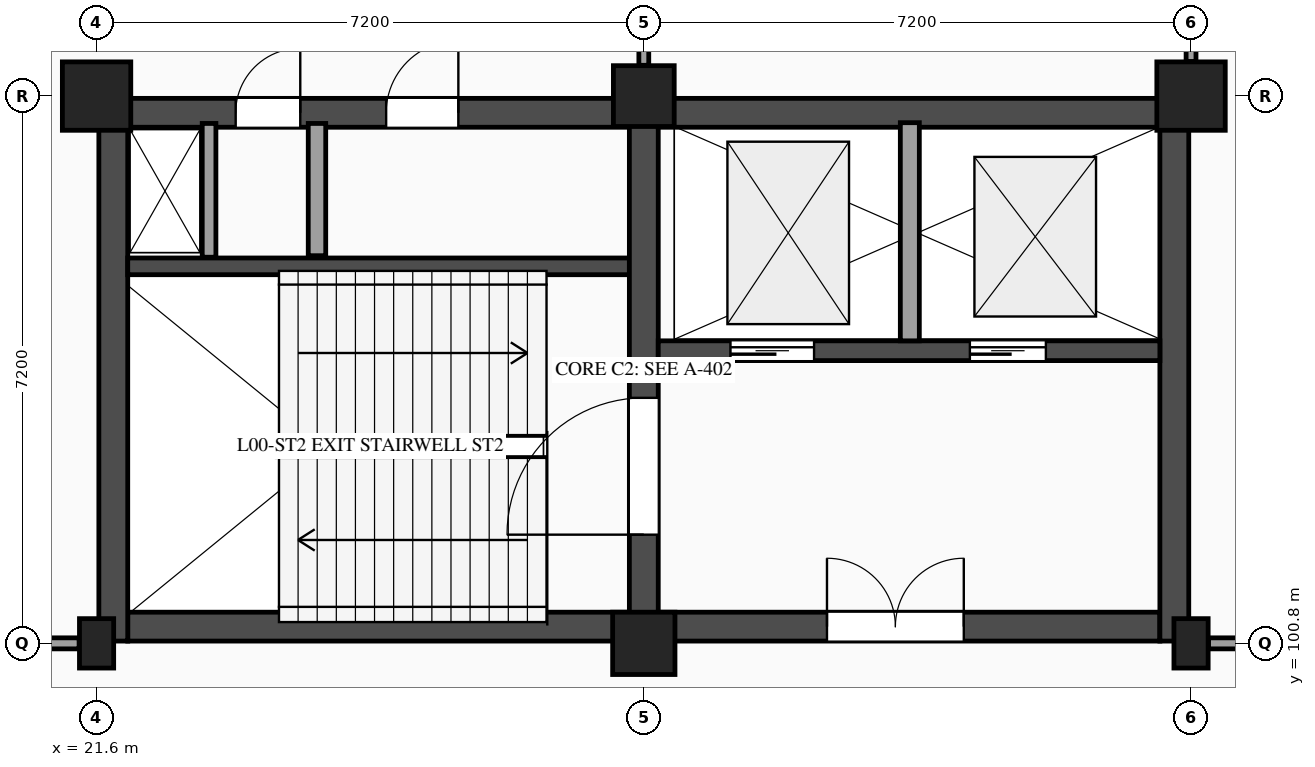
"""IFC4 building model, lengths in metres.
Left out: names, types, materials, properties, quantities, classifications, styles, units other than length and angle.
Written with IfcOpenShell. Run it as: python <this file> out.ifc"""

import sys

from ifc_helpers import new_model, si_unit, direction, frame, frame_2d, origin, origin_2d, place, context, subcontext, project, spatial, rectangle, extrude, element, fill, save


model = new_model("IFC4")
c1 = context("Model", 3, precision=1e-05, world=origin(), true_north=direction((0.0, 1.0)))
c2 = subcontext(c1, "Body", "Model", "MODEL_VIEW")
j1 = project(units=[si_unit("LENGTHUNIT", "METRE"), si_unit("PLANEANGLEUNIT", "RADIAN")], contexts=[c1])
p1 = place(None, origin())
s1 = spatial("IfcSite", under=j1, at=p1, CompositionType="ELEMENT")
p2 = place(p1, origin())
s2 = spatial("IfcBuilding", under=s1, at=p2, CompositionType="ELEMENT")
p3 = place(p2, origin())
s3 = spatial("IfcBuildingStorey", under=s2, at=p3, CompositionType="ELEMENT", Elevation=0.0)
p4 = place(p3, frame((21.6, 100.8, 0.0), z_axis=(0.0, 0.0, 1.0), x_axis=(1.0, 0.0, 0.0)))
e1 = element("IfcColumn", 1, at=p4, inside=s3, PredefinedType="PILASTER", context=c2, shape_type="SweptSolid", body=[
    extrude(rectangle(XDim=0.45, YDim=0.65, at=origin_2d()), origin(), (0.0, 0.0, 1.0), 5.4),
])
p5 = place(p3, frame((21.6, 108.0, 0.0), z_axis=(0.0, 0.0, 1.0), x_axis=(1.0, 0.0, 0.0)))
e2 = element("IfcColumn", 2, at=p5, inside=s3, PredefinedType="COLUMN", context=c2, shape_type="SweptSolid", body=[
    extrude(rectangle(XDim=0.9, YDim=0.9, at=origin_2d()), origin(), (0.0, 0.0, 1.0), 5.4),
])
p6 = place(p3, frame((28.8, 100.8, 0.0), z_axis=(0.0, 0.0, 1.0), x_axis=(1.0, 0.0, 0.0)))
e3 = element("IfcColumn", 3, at=p6, inside=s3, PredefinedType="COLUMN", context=c2, shape_type="SweptSolid", body=[
    extrude(rectangle(XDim=0.82, YDim=0.82, at=origin_2d()), origin(), (0.0, 0.0, 1.0), 5.4),
])
p7 = place(p3, frame((28.8, 108.0, 0.0), z_axis=(0.0, 0.0, 1.0), x_axis=(1.0, 0.0, 0.0)))
e4 = element("IfcColumn", 4, at=p7, inside=s3, PredefinedType="COLUMN", context=c2, shape_type="SweptSolid", body=[
    extrude(rectangle(XDim=0.8, YDim=0.8, at=origin_2d()), origin(), (0.0, 0.0, 1.0), 5.4),
])
p8 = place(p3, frame((36.0, 100.8, 0.0), z_axis=(0.0, 0.0, 1.0), x_axis=(1.0, 0.0, 0.0)))
e5 = element("IfcColumn", 5, at=p8, inside=s3, PredefinedType="PILASTER", context=c2, shape_type="SweptSolid", body=[
    extrude(rectangle(XDim=0.45, YDim=0.65, at=origin_2d()), origin(), (0.0, 0.0, 1.0), 5.4),
])
p9 = place(p3, frame((36.0, 108.0, 0.0), z_axis=(0.0, 0.0, 1.0), x_axis=(1.0, 0.0, 0.0)))
e6 = element("IfcColumn", 6, at=p9, inside=s3, PredefinedType="COLUMN", context=c2, shape_type="SweptSolid", body=[
    extrude(rectangle(XDim=0.9, YDim=0.9, at=origin_2d()), origin(), (0.0, 0.0, 1.0), 5.4),
])
p10 = place(p3, frame((22.01, 101.02, 0.0), z_axis=(0.0, 0.0, 1.0), x_axis=(1.0, 0.0, 0.0)))
e7 = element("IfcWall", 7, at=p10, inside=s3, PredefinedType="SHEAR", context=c2, shape_type="SweptSolid", body=[
    extrude(rectangle(XDim=6.6, YDim=0.38, at=frame_2d((3.3, 0.0))), origin(), (0.0, 0.0, 1.0), 5.09),
])
p11 = place(p3, frame((21.82, 107.97, 0.0), z_axis=(0.0, 0.0, 1.0), x_axis=(0.0, -1.0, 0.0)))
e8 = element("IfcWall", 8, at=p11, inside=s3, PredefinedType="SHEAR", context=c2, shape_type="SweptSolid", body=[
    extrude(rectangle(XDim=7.14, YDim=0.38, at=frame_2d((3.57, 0.0))), origin(), (0.0, 0.0, 1.0), 5.09),
])
p12 = place(p3, frame((22.01, 107.78, 0.0), z_axis=(0.0, 0.0, 1.0), x_axis=(1.0, 0.0, 0.0)))
e9 = element("IfcWall", 9, at=p12, inside=s3, PredefinedType="SHEAR", context=c2, shape_type="SweptSolid", body=[
    extrude(rectangle(XDim=6.6, YDim=0.38, at=frame_2d((3.3, 0.0))), origin(), (0.0, 0.0, 1.0), 5.09),
])
p13 = place(p12, frame((1.42, 0.0, 0.0)))
e10 = element("IfcOpeningElement", 10, at=p13, cuts=e9, PredefinedType="OPENING", context=c2, shape_type="SweptSolid", body=[
    extrude(rectangle(XDim=0.85, YDim=2.1, at=frame_2d((0.425, 1.05))), frame((0.0, 0.2, 0.0), z_axis=(0.0, -1.0, 0.0), x_axis=(1.0, 0.0, 0.0)), (0.0, 0.0, 1.0), 0.4),
])
p14 = place(p12, frame((3.4, 0.0, 0.0)))
e11 = element("IfcOpeningElement", 11, at=p14, cuts=e9, PredefinedType="OPENING", context=c2, shape_type="SweptSolid", body=[
    extrude(rectangle(XDim=0.95, YDim=2.15, at=frame_2d((0.475, 1.075))), frame((0.0, 0.2, 0.0), z_axis=(0.0, -1.0, 0.0), x_axis=(1.0, 0.0, 0.0)), (0.0, 0.0, 1.0), 0.4),
])
p15 = place(p3, frame((22.01, 105.76, 0.0), z_axis=(0.0, 0.0, 1.0), x_axis=(1.0, 0.0, 0.0)))
e12 = element("IfcWall", 12, at=p15, inside=s3, PredefinedType="SHEAR", context=c2, shape_type="SweptSolid", body=[
    extrude(rectangle(XDim=6.6, YDim=0.22, at=frame_2d((3.3, 0.0))), origin(), (0.0, 0.0, 1.0), 5.09),
])
p16 = place(p3, frame((24.5, 105.9, 0.0), z_axis=(0.0, 0.0, 1.0), x_axis=(0.0, 1.0, 0.0)))
e13 = element("IfcWall", 13, at=p16, inside=s3, PredefinedType="PARTITIONING", context=c2, shape_type="SweptSolid", body=[
    extrude(rectangle(XDim=1.74, YDim=0.23, at=frame_2d((0.87, 0.0))), origin(), (0.0, 0.0, 1.0), 5.09),
])
p17 = place(p3, frame((23.08, 105.88, 0.0), z_axis=(0.0, 0.0, 1.0), x_axis=(0.0, 1.0, 0.0)))
e14 = element("IfcWall", 14, at=p17, inside=s3, PredefinedType="PARTITIONING", context=c2, shape_type="SweptSolid", body=[
    extrude(rectangle(XDim=1.76, YDim=0.18, at=frame_2d((0.88, 0.0))), origin(), (0.0, 0.0, 1.0), 5.09),
])
p18 = place(p3, frame((28.8, 100.83, 0.0), z_axis=(0.0, 0.0, 1.0), x_axis=(0.0, 1.0, 0.0)))
e15 = element("IfcWall", 15, at=p18, inside=s3, PredefinedType="SHEAR", context=c2, shape_type="SweptSolid", body=[
    extrude(rectangle(XDim=7.14, YDim=0.38, at=frame_2d((3.57, 0.0))), origin(), (0.0, 0.0, 1.0), 5.09),
])
p19 = place(p18, frame((1.4, 0.0, 0.0)))
e16 = element("IfcOpeningElement", 16, at=p19, cuts=e15, PredefinedType="OPENING", context=c2, shape_type="SweptSolid", body=[
    extrude(rectangle(XDim=1.8, YDim=2.2, at=frame_2d((0.9, 1.1))), frame((0.0, 0.2, 0.0), z_axis=(0.0, -1.0, 0.0), x_axis=(1.0, 0.0, 0.0)), (0.0, 0.0, 1.0), 0.4),
])
p20 = place(p3, frame((28.99, 101.02, 0.0), z_axis=(0.0, 0.0, 1.0), x_axis=(1.0, 0.0, 0.0)))
e17 = element("IfcWall", 17, at=p20, inside=s3, PredefinedType="SHEAR", context=c2, shape_type="SweptSolid", body=[
    extrude(rectangle(XDim=6.6, YDim=0.38, at=frame_2d((3.3, 0.0))), origin(), (0.0, 0.0, 1.0), 5.09),
])
p21 = place(p20, frame((2.22, 0.0, 0.0)))
e18 = element("IfcOpeningElement", 18, at=p21, cuts=e17, PredefinedType="OPENING", context=c2, shape_type="SweptSolid", body=[
    extrude(rectangle(XDim=1.8, YDim=2.2, at=frame_2d((0.9, 1.1))), frame((0.0, 0.2, 0.0), z_axis=(0.0, -1.0, 0.0), x_axis=(1.0, 0.0, 0.0)), (0.0, 0.0, 1.0), 0.4),
])
p22 = place(p3, frame((35.78, 100.83, 0.0), z_axis=(0.0, 0.0, 1.0), x_axis=(0.0, 1.0, 0.0)))
e19 = element("IfcWall", 19, at=p22, inside=s3, PredefinedType="SHEAR", context=c2, shape_type="SweptSolid", body=[
    extrude(rectangle(XDim=7.14, YDim=0.38, at=frame_2d((3.57, 0.0))), origin(), (0.0, 0.0, 1.0), 5.09),
])
p23 = place(p3, frame((28.99, 107.78, 0.0), z_axis=(0.0, 0.0, 1.0), x_axis=(1.0, 0.0, 0.0)))
e20 = element("IfcWall", 20, at=p23, inside=s3, PredefinedType="SHEAR", context=c2, shape_type="SweptSolid", body=[
    extrude(rectangle(XDim=6.6, YDim=0.38, at=frame_2d((3.3, 0.0))), origin(), (0.0, 0.0, 1.0), 5.09),
])
p24 = place(p3, frame((28.99, 104.65, 0.0), z_axis=(0.0, 0.0, 1.0), x_axis=(1.0, 0.0, 0.0)))
e21 = element("IfcWall", 21, at=p24, inside=s3, PredefinedType="SHEAR", context=c2, shape_type="SweptSolid", body=[
    extrude(rectangle(XDim=6.6, YDim=0.26, at=frame_2d((3.3, 0.0))), origin(), (0.0, 0.0, 1.0), 5.09),
])
p25 = place(p24, frame((0.95, 0.0, 0.0)))
e22 = element("IfcOpeningElement", 22, at=p25, cuts=e21, PredefinedType="OPENING", context=c2, shape_type="SweptSolid", body=[
    extrude(rectangle(XDim=1.1, YDim=2.2, at=frame_2d((0.55, 1.1))), frame((0.0, 0.14, 0.0), z_axis=(0.0, -1.0, 0.0), x_axis=(1.0, 0.0, 0.0)), (0.0, 0.0, 1.0), 0.28),
])
p26 = place(p24, frame((4.1, 0.0, 0.0)))
e23 = element("IfcOpeningElement", 23, at=p26, cuts=e21, PredefinedType="OPENING", context=c2, shape_type="SweptSolid", body=[
    extrude(rectangle(XDim=1.0, YDim=2.15, at=frame_2d((0.5, 1.075))), frame((0.0, 0.14, 0.0), z_axis=(0.0, -1.0, 0.0), x_axis=(1.0, 0.0, 0.0)), (0.0, 0.0, 1.0), 0.28),
])
p27 = place(p3, frame((32.3, 104.78, 0.0), z_axis=(0.0, 0.0, 1.0), x_axis=(0.0, 1.0, 0.0)))
e24 = element("IfcWall", 24, at=p27, inside=s3, PredefinedType="PARTITIONING", context=c2, shape_type="SweptSolid", body=[
    extrude(rectangle(XDim=2.87, YDim=0.25, at=frame_2d((1.435, 0.0))), origin(), (0.0, 0.0, 1.0), 5.09),
])
p28 = place(p3, frame((14.815, 100.8, 0.0), z_axis=(0.0, 0.0, 1.0), x_axis=(1.0, 0.0, 0.0)))
e25 = element("IfcWall", 25, at=p28, inside=s3, PredefinedType="PARTITIONING", context=c2, shape_type="SweptSolid", body=[
    extrude(rectangle(XDim=6.555, YDim=0.145, at=frame_2d((3.278, 0.0))), origin(), (0.0, 0.0, 1.0), 4.35),
])
p29 = place(p3, frame((28.8, 108.405, 0.0), z_axis=(0.0, 0.0, 1.0), x_axis=(0.0, 1.0, 0.0)))
e26 = element("IfcWall", 26, at=p29, inside=s3, PredefinedType="PARTITIONING", context=c2, shape_type="SweptSolid", body=[
    extrude(rectangle(XDim=6.34, YDim=0.13, at=frame_2d((3.17, 0.0))), origin(), (0.0, 0.0, 1.0), 4.405),
])
p30 = place(p3, frame((36.0, 108.455, 0.0), z_axis=(0.0, 0.0, 1.0), x_axis=(0.0, 1.0, 0.0)))
e27 = element("IfcWall", 27, at=p30, inside=s3, PredefinedType="PARTITIONING", context=c2, shape_type="SweptSolid", body=[
    extrude(rectangle(XDim=6.3, YDim=0.13, at=frame_2d((3.15, 0.0))), origin(), (0.0, 0.0, 1.0), 4.405),
])
p31 = place(p30, frame((2.35, 0.0, 0.0)))
e28 = element("IfcOpeningElement", 28, at=p31, cuts=e27, PredefinedType="OPENING", context=c2, shape_type="SweptSolid", body=[
    extrude(rectangle(XDim=1.6, YDim=2.2, at=frame_2d((0.8, 1.1))), frame((0.0, 0.075, 0.0), z_axis=(0.0, -1.0, 0.0), x_axis=(1.0, 0.0, 0.0)), (0.0, 0.0, 1.0), 0.15),
])
p32 = place(p3, frame((36.23, 100.8, 0.0), z_axis=(0.0, 0.0, 1.0), x_axis=(1.0, 0.0, 0.0)))
e29 = element("IfcWall", 29, at=p32, inside=s3, PredefinedType="PARTITIONING", context=c2, shape_type="SweptSolid", body=[
    extrude(rectangle(XDim=6.555, YDim=0.145, at=frame_2d((3.277, 0.0))), origin(), (0.0, 0.0, 1.0), 4.39),
])
p33 = place(p13, origin())
e30 = element("IfcDoor", 30, at=p33, inside=s3, OperationType="SINGLE_SWING_RIGHT", PredefinedType="DOOR", context=c2, shape_type="SweptSolid", body=[
    extrude(rectangle(XDim=0.85, YDim=2.1, at=frame_2d((0.425, 1.05))), frame((0.0, 0.025, 0.0), z_axis=(0.0, -1.0, 0.0), x_axis=(1.0, 0.0, 0.0)), (0.0, 0.0, 1.0), 0.05),
])
fill(e10, e30)
p34 = place(p19, frame((1.8, 0.0, 0.0), z_axis=(0.0, 0.0, 1.0), x_axis=(-1.0, 0.0, 0.0)))
e31 = element("IfcDoor", 31, at=p34, inside=s3, OperationType="SINGLE_SWING_LEFT", PredefinedType="DOOR", context=c2, shape_type="SweptSolid", body=[
    extrude(rectangle(XDim=1.8, YDim=2.2, at=frame_2d((0.9, 1.1))), frame((0.0, 0.025, 0.0), z_axis=(0.0, -1.0, 0.0), x_axis=(1.0, 0.0, 0.0)), (0.0, 0.0, 1.0), 0.05),
])
fill(e16, e31)
p35 = place(p14, origin())
e32 = element("IfcDoor", 32, at=p35, inside=s3, OperationType="SINGLE_SWING_RIGHT", PredefinedType="DOOR", context=c2, shape_type="SweptSolid", body=[
    extrude(rectangle(XDim=0.95, YDim=2.15, at=frame_2d((0.475, 1.075))), frame((0.0, 0.025, 0.0), z_axis=(0.0, -1.0, 0.0), x_axis=(1.0, 0.0, 0.0)), (0.0, 0.0, 1.0), 0.05),
])
fill(e11, e32)
p36 = place(p25, origin())
e33 = element("IfcDoor", 33, at=p36, inside=s3, OperationType="SLIDING_TO_LEFT", PredefinedType="DOOR", context=c2, shape_type="SweptSolid", body=[
    extrude(rectangle(XDim=1.1, YDim=2.2, at=frame_2d((0.55, 1.1))), frame((0.0, 0.025, 0.0), z_axis=(0.0, -1.0, 0.0), x_axis=(1.0, 0.0, 0.0)), (0.0, 0.0, 1.0), 0.05),
])
fill(e22, e33)
p37 = place(p26, origin())
e34 = element("IfcDoor", 34, at=p37, inside=s3, OperationType="SLIDING_TO_RIGHT", PredefinedType="DOOR", context=c2, shape_type="SweptSolid", body=[
    extrude(rectangle(XDim=1.0, YDim=2.15, at=frame_2d((0.5, 1.075))), frame((0.0, 0.025, 0.0), z_axis=(0.0, -1.0, 0.0), x_axis=(1.0, 0.0, 0.0)), (0.0, 0.0, 1.0), 0.05),
])
fill(e23, e34)
p38 = place(p21, frame((1.8, 0.0, 0.0), z_axis=(0.0, 0.0, 1.0), x_axis=(-1.0, 0.0, 0.0)))
e35 = element("IfcDoor", 35, at=p38, inside=s3, OperationType="DOUBLE_DOOR_SINGLE_SWING", PredefinedType="DOOR", context=c2, shape_type="SweptSolid", body=[
    extrude(rectangle(XDim=1.8, YDim=2.2, at=frame_2d((0.9, 1.1))), frame((0.0, 0.025, 0.0), z_axis=(0.0, -1.0, 0.0), x_axis=(1.0, 0.0, 0.0)), (0.0, 0.0, 1.0), 0.05),
])
fill(e18, e35)
save(model, sys.argv[1])
